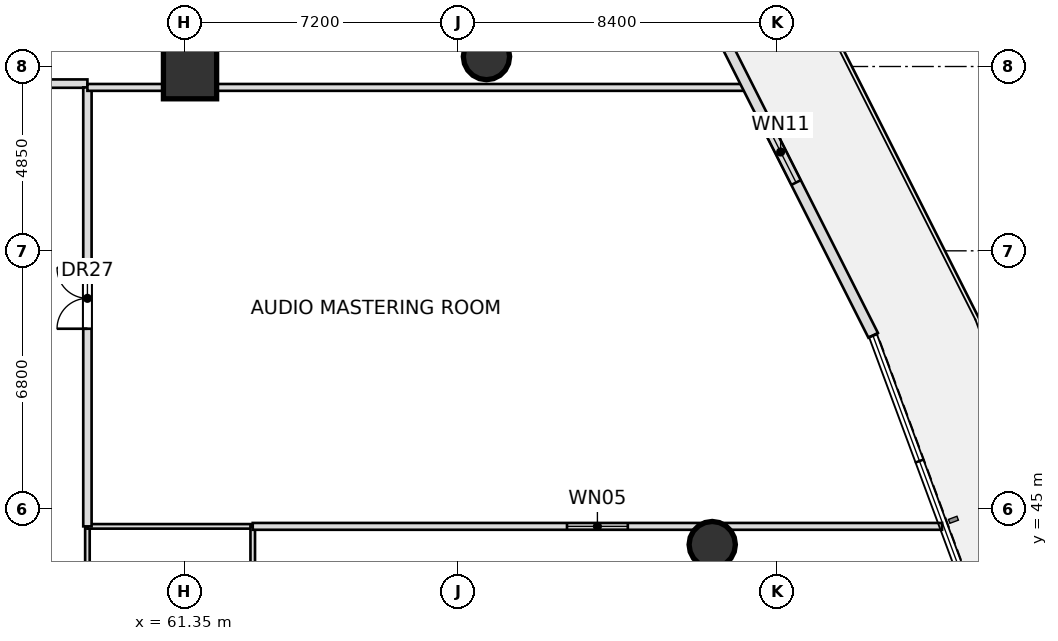
"""IFC4 building model, lengths in metres.
Left out: names, types, materials, properties, quantities, classifications, styles, units other than length and angle.
Written with IfcOpenShell. Run it as: python <this file> out.ifc"""

import sys

from ifc_helpers import new_model, si_unit, direction, frame, frame_2d, origin, origin_2d, place, context, subcontext, project, spatial, rectangle, hollow_circle, extrude, element, fill, save


model = new_model("IFC4")
c1 = context("Model", 3, precision=1e-05, world=origin(), true_north=direction((0.0, 1.0)))
c2 = subcontext(c1, "Body", "Model", "MODEL_VIEW")
j1 = project(units=[si_unit("LENGTHUNIT", "METRE"), si_unit("PLANEANGLEUNIT", "RADIAN")], contexts=[c1])
p1 = place(None, origin())
s1 = spatial("IfcSite", under=j1, at=p1, CompositionType="ELEMENT")
p2 = place(p1, origin())
s2 = spatial("IfcBuilding", under=s1, at=p2, CompositionType="ELEMENT")
p3 = place(p2, frame((0.0, 0.0, 11.4)))
s3 = spatial("IfcBuildingStorey", under=s2, at=p3, CompositionType="ELEMENT", Elevation=11.4)
p4 = place(p3, frame((61.5, 56.5, 0.0), z_axis=(0.0, 0.0, 1.0), x_axis=(1.0, 0.0, 0.0)))
e1 = element("IfcColumn", 1, at=p4, inside=s3, PredefinedType="COLUMN", context=c2, shape_type="SweptSolid", body=[
    extrude(rectangle(XDim=1.4, YDim=1.4, at=origin_2d()), origin(), (0.0, 0.0, 1.0), 5.05),
])
for number, where, z_axis, x_axis in (
    (2, (75.241, 44.07, 0.0), (0.0, 0.0, 1.0), (1.0, 0.0, 0.0)),
    (3, (69.301, 56.911, 0.0), (0.0, 0.0, 1.0), (1.0, 0.0, 0.0)),
):
    element("IfcColumn", number, at=place(p3, frame(where, z_axis=z_axis, x_axis=x_axis)), inside=s3, PredefinedType="COLUMN", context=c2, shape_type="SweptSolid", body=[
        extrude(hollow_circle(Radius=0.61, WallThickness=0.05, at=origin_2d()), origin(), (0.0, 0.0, 1.0), 5.05),
    ])
p5 = place(p3, frame((36.2, 56.2, 0.0), z_axis=(0.0, 0.0, 1.0), x_axis=(1.0, 0.0, 0.0)))
e4 = element("IfcWall", 4, at=p5, inside=s3, PredefinedType="PARTITIONING", context=c2, shape_type="SweptSolid", body=[
    extrude(rectangle(XDim=22.6, YDim=0.22, at=frame_2d((11.3, 0.0))), origin(), (0.0, 0.0, 1.0), 5.05),
])
p6 = place(p5, frame((6.5, 0.0, 0.0)))
e5 = element("IfcOpeningElement", 5, at=p6, cuts=e4, PredefinedType="OPENING", context=c2, shape_type="SweptSolid", body=[
    extrude(rectangle(XDim=1.6, YDim=2.3, at=frame_2d((0.8, 1.15))), frame((0.0, 0.12, 0.0), z_axis=(0.0, -1.0, 0.0), x_axis=(1.0, 0.0, 0.0)), (0.0, 0.0, 1.0), 0.24),
])
p7 = place(p3, frame((58.8, 38.25, 0.0), z_axis=(0.0, 0.0, 1.0), x_axis=(0.0, 1.0, 0.0)))
e6 = element("IfcWall", 6, at=p7, inside=s3, PredefinedType="PARTITIONING", context=c2, shape_type="SweptSolid", body=[
    extrude(rectangle(XDim=6.3, YDim=0.12, at=frame_2d((3.15, 0.0))), origin(), (0.0, 0.0, 1.0), 5.05),
])
p8 = place(p7, frame((0.8, 0.0, 0.0)))
e7 = element("IfcOpeningElement", 7, at=p8, cuts=e6, PredefinedType="OPENING", context=c2, shape_type="SweptSolid", body=[
    extrude(rectangle(XDim=0.9, YDim=2.05, at=frame_2d((0.45, 1.025))), frame((0.0, 0.07, 0.0), z_axis=(0.0, -1.0, 0.0), x_axis=(1.0, 0.0, 0.0)), (0.0, 0.0, 1.0), 0.14),
])
p9 = place(p7, frame((3.85, 0.0, 0.0)))
e8 = element("IfcOpeningElement", 8, at=p9, cuts=e6, PredefinedType="OPENING", context=c2, shape_type="SweptSolid", body=[
    extrude(rectangle(XDim=0.9, YDim=2.05, at=frame_2d((0.45, 1.025))), frame((0.0, 0.07, 0.0), z_axis=(0.0, -1.0, 0.0), x_axis=(1.0, 0.0, 0.0)), (0.0, 0.0, 1.0), 0.14),
])
p10 = place(p3, frame((58.8, 44.55, 0.0), z_axis=(0.0, 0.0, 1.0), x_axis=(1.0, 0.0, 0.0)))
e9 = element("IfcWall", 9, at=p10, inside=s3, PredefinedType="PARTITIONING", context=c2, shape_type="SweptSolid", body=[
    extrude(rectangle(XDim=4.35, YDim=0.12, at=frame_2d((2.175, 0.0))), origin(), (0.0, 0.0, 1.0), 5.05),
])
p11 = place(p3, frame((63.15, 38.25, 0.0), z_axis=(0.0, 0.0, 1.0), x_axis=(0.0, 1.0, 0.0)))
e10 = element("IfcWall", 10, at=p11, inside=s3, PredefinedType="PARTITIONING", context=c2, shape_type="SweptSolid", body=[
    extrude(rectangle(XDim=6.3, YDim=0.12, at=frame_2d((3.15, 0.0))), origin(), (0.0, 0.0, 1.0), 5.05),
])
p12 = place(p3, frame((58.8, 44.55, 0.0), z_axis=(0.0, 0.0, 1.0), x_axis=(0.0, 1.0, 0.0)))
e11 = element("IfcWall", 11, at=p12, inside=s3, PredefinedType="PARTITIONING", context=c2, shape_type="SweptSolid", body=[
    extrude(rectangle(XDim=11.55, YDim=0.22, at=frame_2d((5.775, 0.0))), origin(), (0.0, 0.0, 1.0), 4.125),
])
p13 = place(p12, frame((5.2, 0.0, 0.0)))
e12 = element("IfcOpeningElement", 12, at=p13, cuts=e11, PredefinedType="OPENING", context=c2, shape_type="SweptSolid", body=[
    extrude(rectangle(XDim=1.6, YDim=2.3, at=frame_2d((0.8, 1.15))), frame((0.0, 0.12, 0.0), z_axis=(0.0, -1.0, 0.0), x_axis=(1.0, 0.0, 0.0)), (0.0, 0.0, 1.0), 0.24),
])
p14 = place(p3, frame((58.8, 56.1, 0.0), z_axis=(0.0, 0.0, 1.0), x_axis=(1.0, 0.0, 0.0)))
e13 = element("IfcWall", 13, at=p14, inside=s3, PredefinedType="PARTITIONING", context=c2, shape_type="SweptSolid", body=[
    extrude(rectangle(XDim=17.339, YDim=0.18, at=frame_2d((8.669, 0.0))), origin(), (0.0, 0.0, 1.0), 4.225),
])
p15 = place(p3, frame((63.15, 44.55, 0.0), z_axis=(0.0, 0.0, 1.0), x_axis=(1.0, 0.0, 0.0)))
e14 = element("IfcWall", 14, at=p15, inside=s3, PredefinedType="PARTITIONING", context=c2, shape_type="SweptSolid", body=[
    extrude(rectangle(XDim=18.14, YDim=0.18, at=frame_2d((9.07, 0.0))), origin(), (0.0, 0.0, 1.0), 5.05),
])
p16 = place(p15, frame((8.27, 0.0, 1.05)))
e15 = element("IfcOpeningElement", 15, at=p16, cuts=e14, PredefinedType="OPENING", context=c2, shape_type="SweptSolid", body=[
    extrude(rectangle(XDim=1.6, YDim=1.35, at=frame_2d((0.8, 0.675))), frame((0.0, 0.1, 0.0), z_axis=(0.0, -1.0, 0.0), x_axis=(1.0, 0.0, 0.0)), (0.0, 0.0, 1.0), 0.2),
])
p17 = place(p3, frame((79.476, 49.577, 0.0), z_axis=(0.0, 0.0, 1.0), x_axis=(-0.450617203549, 0.892717276558, 0.0)))
e16 = element("IfcWall", 16, at=p17, inside=s3, PredefinedType="STANDARD", context=c2, shape_type="SweptSolid", body=[
    extrude(rectangle(XDim=10.807, YDim=0.28, at=frame_2d((5.403, 0.0))), origin(), (0.0, 0.0, 1.0), 5.05),
])
p18 = place(p17, frame((4.503, 0.0, 1.0)))
e17 = element("IfcOpeningElement", 17, at=p18, cuts=e16, PredefinedType="OPENING", context=c2, shape_type="SweptSolid", body=[
    extrude(rectangle(XDim=1.8, YDim=2.2, at=frame_2d((0.9, 1.1))), frame((0.0, 0.15, 0.0), z_axis=(0.0, -1.0, 0.0), x_axis=(1.0, 0.0, 0.0)), (0.0, 0.0, 1.0), 0.3),
])
p19 = place(p13, origin())
e18 = element("IfcDoor", 18, at=p19, inside=s3, OperationType="DOUBLE_DOOR_SINGLE_SWING", PredefinedType="DOOR", context=c2, shape_type="SweptSolid", body=[
    extrude(rectangle(XDim=1.6, YDim=2.3, at=frame_2d((0.8, 1.15))), frame((0.0, 0.025, 0.0), z_axis=(0.0, -1.0, 0.0), x_axis=(1.0, 0.0, 0.0)), (0.0, 0.0, 1.0), 0.05),
])
fill(e12, e18)
p20 = place(p18, origin())
e19 = element("IfcWindow", 19, at=p20, inside=s3, PartitioningType="SINGLE_PANEL", PredefinedType="WINDOW", context=c2, shape_type="SweptSolid", body=[
    extrude(rectangle(XDim=1.8, YDim=2.2, at=frame_2d((0.9, 1.1))), frame((0.0, 0.03, 0.0), z_axis=(0.0, -1.0, 0.0), x_axis=(1.0, 0.0, 0.0)), (0.0, 0.0, 1.0), 0.06),
])
fill(e17, e19)
p21 = place(p16, origin())
e20 = element("IfcWindow", 20, at=p21, inside=s3, PartitioningType="SINGLE_PANEL", PredefinedType="WINDOW", context=c2, shape_type="SweptSolid", body=[
    extrude(rectangle(XDim=1.6, YDim=1.35, at=frame_2d((0.8, 0.675))), frame((0.0, 0.03, 0.0), z_axis=(0.0, -1.0, 0.0), x_axis=(1.0, 0.0, 0.0)), (0.0, 0.0, 1.0), 0.06),
])
fill(e15, e20)
save(model, sys.argv[1])
